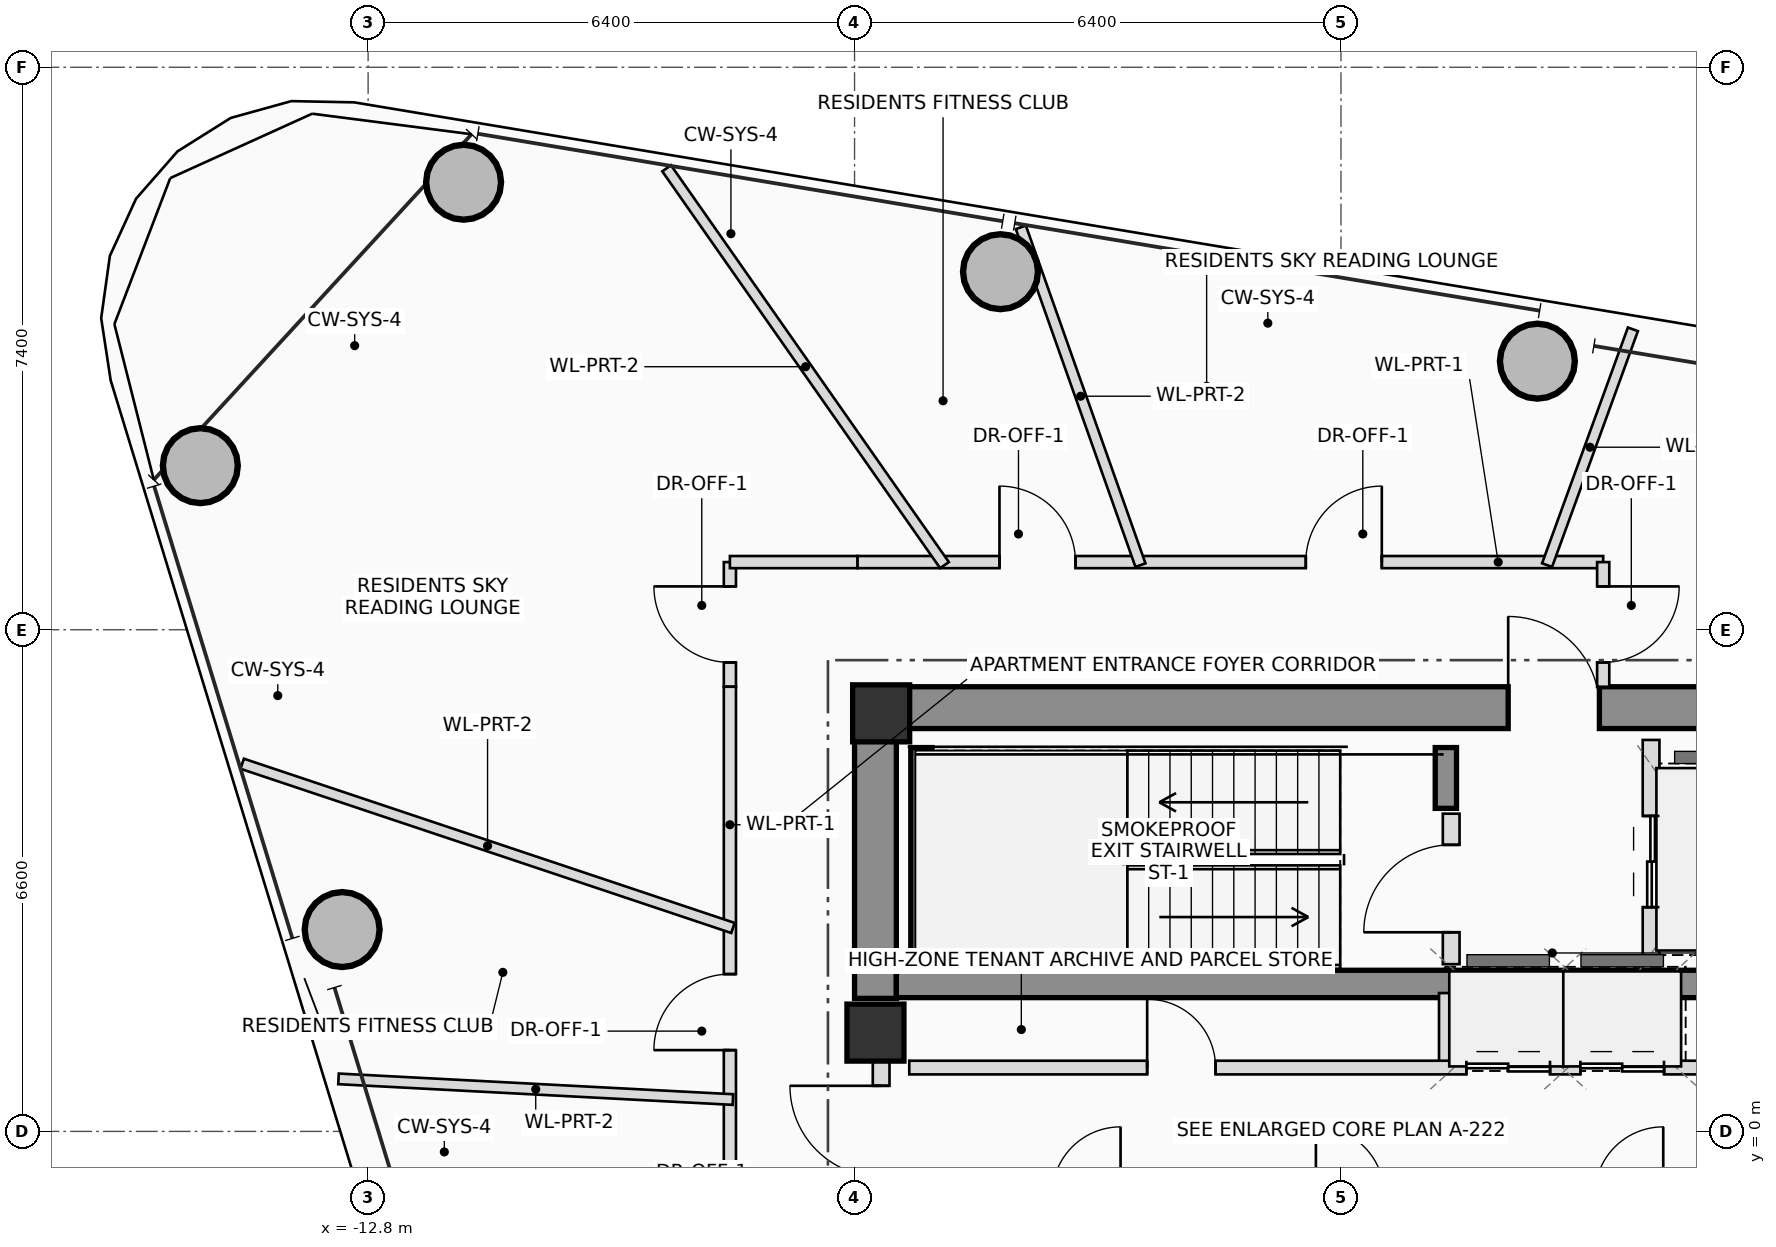
"""IFC4 building model, lengths in metres.
Left out: names, types, materials, properties, quantities, classifications, styles, units other than length and angle.
Written with IfcOpenShell. Run it as: python <this file> out.ifc"""

import sys

from ifc_helpers import new_model, si_unit, direction, frame, frame_2d, origin, origin_2d, place, context, subcontext, project, spatial, rectangle, hollow_circle, extrude, source, transform, mapped, element, fill, save


model = new_model("IFC4")
c1 = context("Model", 3, precision=1e-05, world=origin(), true_north=direction((0.0, 1.0)))
c2 = subcontext(c1, "Body", "Model", "MODEL_VIEW")
j1 = project(units=[si_unit("LENGTHUNIT", "METRE"), si_unit("PLANEANGLEUNIT", "RADIAN")], contexts=[c1])
p1 = place(None, origin())
s1 = spatial("IfcSite", under=j1, at=p1, CompositionType="ELEMENT")
p2 = place(p1, origin())
s2 = spatial("IfcBuilding", under=s1, at=p2, CompositionType="ELEMENT")
p3 = place(p2, frame((0.0, 0.0, 232.05)))
s3 = spatial("IfcBuildingStorey", under=s2, at=p3, CompositionType="ELEMENT", Elevation=232.05)
m1 = source(origin(), c2, "Body", "SweptSolid", [
    extrude(rectangle(XDim=0.75, YDim=0.75, at=origin_2d()), origin(), (0.0, 0.0, 1.0), 3.4),
])
p4 = place(p3, frame((-6.05, 5.5, 0.0), z_axis=(0.0, 0.0, 1.0), x_axis=(1.0, 0.0, 0.0)))
e1 = element("IfcColumn", 1, at=p4, inside=s3, PredefinedType="COLUMN", context=c2, shape_type="MappedRepresentation", body=[
    mapped(m1, transform((0.0, 0.0, 0.0), scale=1.0)),
])
p5 = place(p3, frame((-6.4, 5.575, 0.0), z_axis=(0.0, 0.0, 1.0), x_axis=(1.0, 0.0, 0.0)))
e2 = element("IfcWall", 2, at=p5, inside=s3, PredefinedType="SHEAR", context=c2, shape_type="SweptSolid", body=[
    extrude(rectangle(XDim=12.8, YDim=0.55, at=frame_2d((6.4, 0.0))), origin(), (0.0, 0.0, 1.0), 3.4),
])
p6 = place(p5, frame((8.6, 0.0, 0.0)))
e3 = element("IfcOpeningElement", 3, at=p6, cuts=e2, PredefinedType="OPENING", context=c2, shape_type="SweptSolid", body=[
    extrude(rectangle(XDim=1.2, YDim=2.2, at=frame_2d((0.6, 1.1))), frame((0.0, 0.285, 0.0), z_axis=(0.0, -1.0, 0.0), x_axis=(1.0, 0.0, 0.0)), (0.0, 0.0, 1.0), 0.57),
])
p7 = place(p3, frame((-6.125, 1.75, 0.0), z_axis=(0.0, 0.0, 1.0), x_axis=(0.0, 1.0, 0.0)))
e4 = element("IfcWall", 4, at=p7, inside=s3, PredefinedType="SHEAR", context=c2, shape_type="SweptSolid", body=[
    extrude(rectangle(XDim=3.55, YDim=0.55, at=frame_2d((1.775, 0.0))), origin(), (0.0, 0.0, 1.0), 3.4),
])
p8 = place(p3, frame((-5.85, 1.94, 0.0), z_axis=(0.0, 0.0, 1.0), x_axis=(1.0, 0.0, 0.0)))
e5 = element("IfcWall", 5, at=p8, inside=s3, PredefinedType="SHEAR", context=c2, shape_type="SweptSolid", body=[
    extrude(rectangle(XDim=11.7, YDim=0.36, at=frame_2d((5.85, 0.0))), origin(), (0.0, 0.0, 1.0), 3.4),
])
p9 = place(p3, frame((-5.52, 2.3, 0.0), z_axis=(0.0, 0.0, 1.0), x_axis=(0.0, 1.0, 0.0)))
e6 = element("IfcWall", 6, at=p9, inside=s3, PredefinedType="SHEAR", context=c2, shape_type="SweptSolid", body=[
    extrude(rectangle(XDim=2.75, YDim=0.28, at=frame_2d((1.375, 0.0))), origin(), (0.0, 0.0, 1.0), 3.4),
])
p10 = place(p3, frame((1.38, 4.25, 0.0), z_axis=(0.0, 0.0, 1.0), x_axis=(0.0, 1.0, 0.0)))
e7 = element("IfcWall", 7, at=p10, inside=s3, PredefinedType="SHEAR", context=c2, shape_type="SweptSolid", body=[
    extrude(rectangle(XDim=0.8, YDim=0.28, at=frame_2d((0.4, 0.0))), origin(), (0.0, 0.0, 1.0), 3.4),
])
p11 = place(p3, frame((-6.125, 1.3, 0.0), z_axis=(0.0, 0.0, 1.0), x_axis=(1.0, 0.0, 0.0)))
e8 = element("IfcColumn", 8, at=p11, inside=s3, PredefinedType="COLUMN", context=c2, shape_type="MappedRepresentation", body=[
    mapped(m1, transform((0.0, 0.0, 0.0), scale=1.0)),
])
m2 = source(origin(), c2, "Body", "SweptSolid", [
    extrude(hollow_circle(Radius=0.5, WallThickness=0.04, at=origin_2d()), origin(), (0.0, 0.0, 1.0), 3.4),
])
for number, where, z_axis, x_axis in (
    (9, (2.584, 10.134, 0.0), (0.0, 0.0, 1.0), (1.0, 0.0, 0.0)),
    (10, (-4.48, 11.311, 0.0), (0.0, 0.0, 1.0), (1.0, 0.0, 0.0)),
    (11, (-11.544, 12.488, 0.0), (0.0, 0.0, 1.0), (1.0, 0.0, 0.0)),
    (12, (-15.008, 8.759, 0.0), (0.0, 0.0, 1.0), (1.0, 0.0, 0.0)),
    (13, (-13.142, 2.656, 0.0), (0.0, 0.0, 1.0), (1.0, 0.0, 0.0)),
):
    element("IfcColumn", number, at=place(p3, frame(where, z_axis=z_axis, x_axis=x_axis)), inside=s3, PredefinedType="COLUMN", context=c2, shape_type="MappedRepresentation", body=[
        mapped(m2, transform((0.0, 0.0, 0.0), scale=1.0)),
    ])
p12 = place(p3, frame((-6.05, -0.95, 0.0), z_axis=(0.0, 0.0, 1.0), x_axis=(0.0, 1.0, 0.0)))
e14 = element("IfcWall", 14, at=p12, inside=s3, PredefinedType="PLUMBINGWALL", context=c2, shape_type="SweptSolid", body=[
    extrude(rectangle(XDim=1.9, YDim=0.22, at=frame_2d((0.95, 0.0))), origin(), (0.0, 0.0, 1.0), 2.18),
])
p13 = place(p12, frame((0.35, 0.0, 0.0)))
e15 = element("IfcOpeningElement", 15, at=p13, cuts=e14, PredefinedType="OPENING", context=c2, shape_type="SweptSolid", body=[
    extrude(rectangle(XDim=1.2, YDim=2.2, at=frame_2d((0.6, 1.1))), frame((0.0, 0.12, 0.0), z_axis=(0.0, -1.0, 0.0), x_axis=(1.0, 0.0, 0.0)), (0.0, 0.0, 1.0), 0.24),
])
p14 = place(p3, frame((1.45, 2.2, 0.0), z_axis=(0.0, 0.0, 1.0), x_axis=(0.0, 1.0, 0.0)))
e16 = element("IfcWall", 16, at=p14, inside=s3, PredefinedType="PLUMBINGWALL", context=c2, shape_type="SweptSolid", body=[
    extrude(rectangle(XDim=1.98, YDim=0.22, at=frame_2d((0.99, 0.0))), origin(), (0.0, 0.0, 1.0), 3.2),
])
p15 = place(p14, frame((0.42, 0.0, 0.0)))
e17 = element("IfcOpeningElement", 17, at=p15, cuts=e16, PredefinedType="OPENING", context=c2, shape_type="SweptSolid", body=[
    extrude(rectangle(XDim=1.15, YDim=2.15, at=frame_2d((0.575, 1.075))), frame((0.0, 0.12, 0.0), z_axis=(0.0, -1.0, 0.0), x_axis=(1.0, 0.0, 0.0)), (0.0, 0.0, 1.0), 0.24),
])
p16 = place(p3, frame((4.08, 2.2, 0.0), z_axis=(0.0, 0.0, 1.0), x_axis=(0.0, 1.0, 0.0)))
e18 = element("IfcWall", 18, at=p16, inside=s3, PredefinedType="PLUMBINGWALL", context=c2, shape_type="SweptSolid", body=[
    extrude(rectangle(XDim=2.95, YDim=0.22, at=frame_2d((1.475, 0.0))), origin(), (0.0, 0.0, 1.0), 3.2),
])
p17 = place(p16, frame((0.75, 0.0, 0.0)))
e19 = element("IfcOpeningElement", 19, at=p17, cuts=e18, PredefinedType="OPENING", context=c2, shape_type="SweptSolid", body=[
    extrude(rectangle(XDim=1.2, YDim=2.25, at=frame_2d((0.6, 1.125))), frame((0.0, 0.12, 0.0), z_axis=(0.0, -1.0, 0.0), x_axis=(1.0, 0.0, 0.0)), (0.0, 0.0, 1.0), 0.24),
])
for number, where, z_axis, x_axis in (
    (20, (1.38, 0.84, 0.0), (0.0, 0.0, 1.0), (0.0, 1.0, 0.0)),
    (21, (3.02, 0.84, 0.0), (0.0, 0.0, 1.0), (0.0, 1.0, 0.0)),
    (22, (4.38, 0.84, 0.0), (0.0, 0.0, 1.0), (0.0, 1.0, 0.0)),
):
    element("IfcWall", number, at=place(p3, frame(where, z_axis=z_axis, x_axis=x_axis)), inside=s3, PredefinedType="PLUMBINGWALL", context=c2, shape_type="SweptSolid", body=[
        extrude(rectangle(XDim=0.98, YDim=0.18, at=frame_2d((0.49, 0.0))), origin(), (0.0, 0.0, 1.0), 3.2),
    ])
p18 = place(p3, frame((-5.68, 0.84, 0.0), z_axis=(0.0, 0.0, 1.0), x_axis=(1.0, 0.0, 0.0)))
e23 = element("IfcWall", 23, at=p18, inside=s3, PredefinedType="PLUMBINGWALL", context=c2, shape_type="SweptSolid", body=[
    extrude(rectangle(XDim=11.33, YDim=0.18, at=frame_2d((5.665, 0.0))), origin(), (0.0, 0.0, 1.0), 3.2),
])
p19 = place(p18, frame((3.13, 0.0, 0.0)))
e24 = element("IfcOpeningElement", 24, at=p19, cuts=e23, PredefinedType="OPENING", context=c2, shape_type="SweptSolid", body=[
    extrude(rectangle(XDim=0.9, YDim=2.05, at=frame_2d((0.45, 1.025))), frame((0.0, 0.1, 0.0), z_axis=(0.0, -1.0, 0.0), x_axis=(1.0, 0.0, 0.0)), (0.0, 0.0, 1.0), 0.2),
])
p20 = place(p18, frame((7.33, 0.0, 0.0)))
e25 = element("IfcOpeningElement", 25, at=p20, cuts=e23, PredefinedType="OPENING", context=c2, shape_type="SweptSolid", body=[
    extrude(rectangle(XDim=1.1, YDim=2.2, at=frame_2d((0.55, 1.1))), frame((0.0, 0.1, 0.0), z_axis=(0.0, -1.0, 0.0), x_axis=(1.0, 0.0, 0.0)), (0.0, 0.0, 1.0), 0.2),
])
p21 = place(p18, frame((8.83, 0.0, 0.0)))
e26 = element("IfcOpeningElement", 26, at=p21, cuts=e23, PredefinedType="OPENING", context=c2, shape_type="SweptSolid", body=[
    extrude(rectangle(XDim=1.1, YDim=2.2, at=frame_2d((0.55, 1.1))), frame((0.0, 0.1, 0.0), z_axis=(0.0, -1.0, 0.0), x_axis=(1.0, 0.0, 0.0)), (0.0, 0.0, 1.0), 0.2),
])
p22 = place(p3, frame((-8.04, 5.85, 0.0), z_axis=(0.0, 0.0, 1.0), x_axis=(0.0, 1.0, 0.0)))
e27 = element("IfcWall", 27, at=p22, inside=s3, PredefinedType="PARTITIONING", context=c2, shape_type="SweptSolid", body=[
    extrude(rectangle(XDim=1.64, YDim=0.16, at=frame_2d((0.82, 0.0))), origin(), (0.0, 0.0, 1.0), 2.605),
])
p23 = place(p22, frame((0.32, 0.0, 0.0)))
e28 = element("IfcOpeningElement", 28, at=p23, cuts=e27, PredefinedType="OPENING", context=c2, shape_type="SweptSolid", body=[
    extrude(rectangle(XDim=1.0, YDim=2.25, at=frame_2d((0.5, 1.125))), frame((0.0, 0.09, 0.0), z_axis=(0.0, -1.0, 0.0), x_axis=(1.0, 0.0, 0.0)), (0.0, 0.0, 1.0), 0.18),
])
p24 = place(p3, frame((-8.04, 7.49, 0.0), z_axis=(0.0, 0.0, 1.0), x_axis=(1.0, 0.0, 0.0)))
e29 = element("IfcWall", 29, at=p24, inside=s3, PredefinedType="PARTITIONING", context=c2, shape_type="SweptSolid", body=[
    extrude(rectangle(XDim=1.68, YDim=0.16, at=frame_2d((0.84, 0.0))), origin(), (0.0, 0.0, 1.0), 2.605),
])
p25 = place(p3, frame((-6.36, 7.49, 0.0), z_axis=(0.0, 0.0, 1.0), x_axis=(1.0, 0.0, 0.0)))
e30 = element("IfcWall", 30, at=p25, inside=s3, PredefinedType="PARTITIONING", context=c2, shape_type="SweptSolid", body=[
    extrude(rectangle(XDim=9.81, YDim=0.16, at=frame_2d((4.905, 0.0))), origin(), (0.0, 0.0, 1.0), 2.605),
])
p26 = place(p25, frame((1.867, 0.0, 0.0)))
e31 = element("IfcOpeningElement", 31, at=p26, cuts=e30, PredefinedType="OPENING", context=c2, shape_type="SweptSolid", body=[
    extrude(rectangle(XDim=1.0, YDim=2.25, at=frame_2d((0.5, 1.125))), frame((0.0, 0.09, 0.0), z_axis=(0.0, -1.0, 0.0), x_axis=(1.0, 0.0, 0.0)), (0.0, 0.0, 1.0), 0.18),
])
p27 = place(p25, frame((5.897, 0.0, 0.0)))
e32 = element("IfcOpeningElement", 32, at=p27, cuts=e30, PredefinedType="OPENING", context=c2, shape_type="SweptSolid", body=[
    extrude(rectangle(XDim=1.0, YDim=2.25, at=frame_2d((0.5, 1.125))), frame((0.0, 0.09, 0.0), z_axis=(0.0, -1.0, 0.0), x_axis=(1.0, 0.0, 0.0)), (0.0, 0.0, 1.0), 0.18),
])
p28 = place(p3, frame((3.45, 7.49, 0.0), z_axis=(0.0, 0.0, 1.0), x_axis=(0.0, -1.0, 0.0)))
e33 = element("IfcWall", 33, at=p28, inside=s3, PredefinedType="PARTITIONING", context=c2, shape_type="SweptSolid", body=[
    extrude(rectangle(XDim=1.64, YDim=0.16, at=frame_2d((0.82, 0.0))), origin(), (0.0, 0.0, 1.0), 3.2),
])
p29 = place(p28, frame((0.32, 0.0, 0.0)))
e34 = element("IfcOpeningElement", 34, at=p29, cuts=e33, PredefinedType="OPENING", context=c2, shape_type="SweptSolid", body=[
    extrude(rectangle(XDim=1.0, YDim=2.25, at=frame_2d((0.5, 1.125))), frame((0.0, 0.09, 0.0), z_axis=(0.0, -1.0, 0.0), x_axis=(1.0, 0.0, 0.0)), (0.0, 0.0, 1.0), 0.18),
])
p30 = place(p3, frame((-8.04, -5.85, 0.0), z_axis=(0.0, 0.0, 1.0), x_axis=(0.0, 1.0, 0.0)))
e35 = element("IfcWall", 35, at=p30, inside=s3, PredefinedType="PARTITIONING", context=c2, shape_type="SweptSolid", body=[
    extrude(rectangle(XDim=11.7, YDim=0.16, at=frame_2d((5.85, 0.0))), origin(), (0.0, 0.0, 1.0), 2.605),
])
p31 = place(p30, frame((2.977, 0.0, 0.0)))
e36 = element("IfcOpeningElement", 36, at=p31, cuts=e35, PredefinedType="OPENING", context=c2, shape_type="SweptSolid", body=[
    extrude(rectangle(XDim=1.0, YDim=2.25, at=frame_2d((0.5, 1.125))), frame((0.0, 0.09, 0.0), z_axis=(0.0, -1.0, 0.0), x_axis=(1.0, 0.0, 0.0)), (0.0, 0.0, 1.0), 0.18),
])
p32 = place(p30, frame((6.919, 0.0, 0.0)))
e37 = element("IfcOpeningElement", 37, at=p32, cuts=e35, PredefinedType="OPENING", context=c2, shape_type="SweptSolid", body=[
    extrude(rectangle(XDim=1.0, YDim=2.25, at=frame_2d((0.5, 1.125))), frame((0.0, 0.09, 0.0), z_axis=(0.0, -1.0, 0.0), x_axis=(1.0, 0.0, 0.0)), (0.0, 0.0, 1.0), 0.18),
])
p33 = place(p3, frame((2.712, 7.45, 0.0), z_axis=(0.0, 0.0, 1.0), x_axis=(0.341974588874, 0.9397092, 0.0)))
e38 = element("IfcWall", 38, at=p33, inside=s3, PredefinedType="PARTITIONING", context=c2, shape_type="SweptSolid", body=[
    extrude(rectangle(XDim=3.302, YDim=0.14, at=frame_2d((1.651, 0.0))), origin(), (0.0, 0.0, 1.0), 2.605),
])
p34 = place(p3, frame((-2.638, 7.45, 0.0), z_axis=(0.0, 0.0, 1.0), x_axis=(-0.333819345572, 0.942637069355, 0.0)))
e39 = element("IfcWall", 39, at=p34, inside=s3, PredefinedType="PARTITIONING", context=c2, shape_type="SweptSolid", body=[
    extrude(rectangle(XDim=4.715, YDim=0.14, at=frame_2d((2.357, 0.0))), origin(), (0.0, 0.0, 1.0), 2.765),
])
p35 = place(p3, frame((-5.217, 7.45, 0.0), z_axis=(0.0, 0.0, 1.0), x_axis=(-0.573578024676, 0.819150932129, 0.0)))
e40 = element("IfcWall", 40, at=p35, inside=s3, PredefinedType="PARTITIONING", context=c2, shape_type="SweptSolid", body=[
    extrude(rectangle(XDim=6.374, YDim=0.14, at=frame_2d((3.187, 0.0))), origin(), (0.0, 0.0, 1.0), 2.605),
])
p36 = place(p3, frame((-8.0, 2.677, 0.0), z_axis=(0.0, 0.0, 1.0), x_axis=(-0.948324112853, 0.317303288639, 0.0)))
e41 = element("IfcWall", 41, at=p36, inside=s3, PredefinedType="PARTITIONING", context=c2, shape_type="SweptSolid", body=[
    extrude(rectangle(XDim=6.809, YDim=0.14, at=frame_2d((3.404, 0.0))), origin(), (0.0, 0.0, 1.0), 2.605),
])
p37 = place(p3, frame((-8.0, 0.419, 0.0), z_axis=(0.0, 0.0, 1.0), x_axis=(-0.998629485047, 0.052336904702, 0.0)))
e42 = element("IfcWall", 42, at=p37, inside=s3, PredefinedType="PARTITIONING", context=c2, shape_type="SweptSolid", body=[
    extrude(rectangle(XDim=5.197, YDim=0.14, at=frame_2d((2.598, 0.0))), origin(), (0.0, 0.0, 1.0), 2.765),
])
p38 = place(p6, origin())
e43 = element("IfcDoor", 43, at=p38, inside=s3, OperationType="SINGLE_SWING_LEFT", PredefinedType="DOOR", context=c2, shape_type="SweptSolid", body=[
    extrude(rectangle(XDim=1.2, YDim=2.2, at=frame_2d((0.6, 1.1))), frame((0.0, 0.025, 0.0), z_axis=(0.0, -1.0, 0.0), x_axis=(1.0, 0.0, 0.0)), (0.0, 0.0, 1.0), 0.05),
])
fill(e3, e43)
p39 = place(p13, origin())
e44 = element("IfcDoor", 44, at=p39, inside=s3, OperationType="SINGLE_SWING_RIGHT", PredefinedType="DOOR", context=c2, shape_type="SweptSolid", body=[
    extrude(rectangle(XDim=1.2, YDim=2.2, at=frame_2d((0.6, 1.1))), frame((0.0, 0.025, 0.0), z_axis=(0.0, -1.0, 0.0), x_axis=(1.0, 0.0, 0.0)), (0.0, 0.0, 1.0), 0.05),
])
fill(e15, e44)
p40 = place(p15, origin())
e45 = element("IfcDoor", 45, at=p40, inside=s3, OperationType="SINGLE_SWING_LEFT", PredefinedType="DOOR", context=c2, shape_type="SweptSolid", body=[
    extrude(rectangle(XDim=1.15, YDim=2.15, at=frame_2d((0.575, 1.075))), frame((0.0, 0.025, 0.0), z_axis=(0.0, -1.0, 0.0), x_axis=(1.0, 0.0, 0.0)), (0.0, 0.0, 1.0), 0.05),
])
fill(e17, e45)
p41 = place(p17, origin())
e46 = element("IfcDoor", 46, at=p41, inside=s3, OperationType="DOUBLE_DOOR_SLIDING", PredefinedType="DOOR", context=c2, shape_type="SweptSolid", body=[
    extrude(rectangle(XDim=1.2, YDim=2.25, at=frame_2d((0.6, 1.125))), frame((0.0, 0.025, 0.0), z_axis=(0.0, -1.0, 0.0), x_axis=(1.0, 0.0, 0.0)), (0.0, 0.0, 1.0), 0.05),
])
fill(e19, e46)
p42 = place(p19, origin())
e47 = element("IfcDoor", 47, at=p42, inside=s3, OperationType="SINGLE_SWING_LEFT", PredefinedType="DOOR", context=c2, shape_type="SweptSolid", body=[
    extrude(rectangle(XDim=0.9, YDim=2.05, at=frame_2d((0.45, 1.025))), frame((0.0, 0.025, 0.0), z_axis=(0.0, -1.0, 0.0), x_axis=(1.0, 0.0, 0.0)), (0.0, 0.0, 1.0), 0.05),
])
fill(e24, e47)
p43 = place(p20, origin())
e48 = element("IfcDoor", 48, at=p43, inside=s3, OperationType="DOUBLE_DOOR_SLIDING", PredefinedType="DOOR", context=c2, shape_type="SweptSolid", body=[
    extrude(rectangle(XDim=1.1, YDim=2.2, at=frame_2d((0.55, 1.1))), frame((0.0, 0.025, 0.0), z_axis=(0.0, -1.0, 0.0), x_axis=(1.0, 0.0, 0.0)), (0.0, 0.0, 1.0), 0.05),
])
fill(e25, e48)
p44 = place(p21, origin())
e49 = element("IfcDoor", 49, at=p44, inside=s3, OperationType="DOUBLE_DOOR_SLIDING", PredefinedType="DOOR", context=c2, shape_type="SweptSolid", body=[
    extrude(rectangle(XDim=1.1, YDim=2.2, at=frame_2d((0.55, 1.1))), frame((0.0, 0.025, 0.0), z_axis=(0.0, -1.0, 0.0), x_axis=(1.0, 0.0, 0.0)), (0.0, 0.0, 1.0), 0.05),
])
fill(e26, e49)
p45 = place(p23, origin())
e50 = element("IfcDoor", 50, at=p45, inside=s3, OperationType="SINGLE_SWING_RIGHT", PredefinedType="DOOR", context=c2, shape_type="SweptSolid", body=[
    extrude(rectangle(XDim=1.0, YDim=2.25, at=frame_2d((0.5, 1.125))), frame((0.0, 0.025, 0.0), z_axis=(0.0, -1.0, 0.0), x_axis=(1.0, 0.0, 0.0)), (0.0, 0.0, 1.0), 0.05),
])
fill(e28, e50)
p46 = place(p26, origin())
e51 = element("IfcDoor", 51, at=p46, inside=s3, OperationType="SINGLE_SWING_LEFT", PredefinedType="DOOR", context=c2, shape_type="SweptSolid", body=[
    extrude(rectangle(XDim=1.0, YDim=2.25, at=frame_2d((0.5, 1.125))), frame((0.0, 0.025, 0.0), z_axis=(0.0, -1.0, 0.0), x_axis=(1.0, 0.0, 0.0)), (0.0, 0.0, 1.0), 0.05),
])
fill(e31, e51)
p47 = place(p27, origin())
e52 = element("IfcDoor", 52, at=p47, inside=s3, OperationType="SINGLE_SWING_RIGHT", PredefinedType="DOOR", context=c2, shape_type="SweptSolid", body=[
    extrude(rectangle(XDim=1.0, YDim=2.25, at=frame_2d((0.5, 1.125))), frame((0.0, 0.025, 0.0), z_axis=(0.0, -1.0, 0.0), x_axis=(1.0, 0.0, 0.0)), (0.0, 0.0, 1.0), 0.05),
])
fill(e32, e52)
p48 = place(p29, origin())
e53 = element("IfcDoor", 53, at=p48, inside=s3, OperationType="SINGLE_SWING_LEFT", PredefinedType="DOOR", context=c2, shape_type="SweptSolid", body=[
    extrude(rectangle(XDim=1.0, YDim=2.25, at=frame_2d((0.5, 1.125))), frame((0.0, 0.025, 0.0), z_axis=(0.0, -1.0, 0.0), x_axis=(1.0, 0.0, 0.0)), (0.0, 0.0, 1.0), 0.05),
])
fill(e34, e53)
p49 = place(p32, origin())
e54 = element("IfcDoor", 54, at=p49, inside=s3, OperationType="SINGLE_SWING_LEFT", PredefinedType="DOOR", context=c2, shape_type="SweptSolid", body=[
    extrude(rectangle(XDim=1.0, YDim=2.25, at=frame_2d((0.5, 1.125))), frame((0.0, 0.025, 0.0), z_axis=(0.0, -1.0, 0.0), x_axis=(1.0, 0.0, 0.0)), (0.0, 0.0, 1.0), 0.05),
])
fill(e37, e54)
save(model, sys.argv[1])
